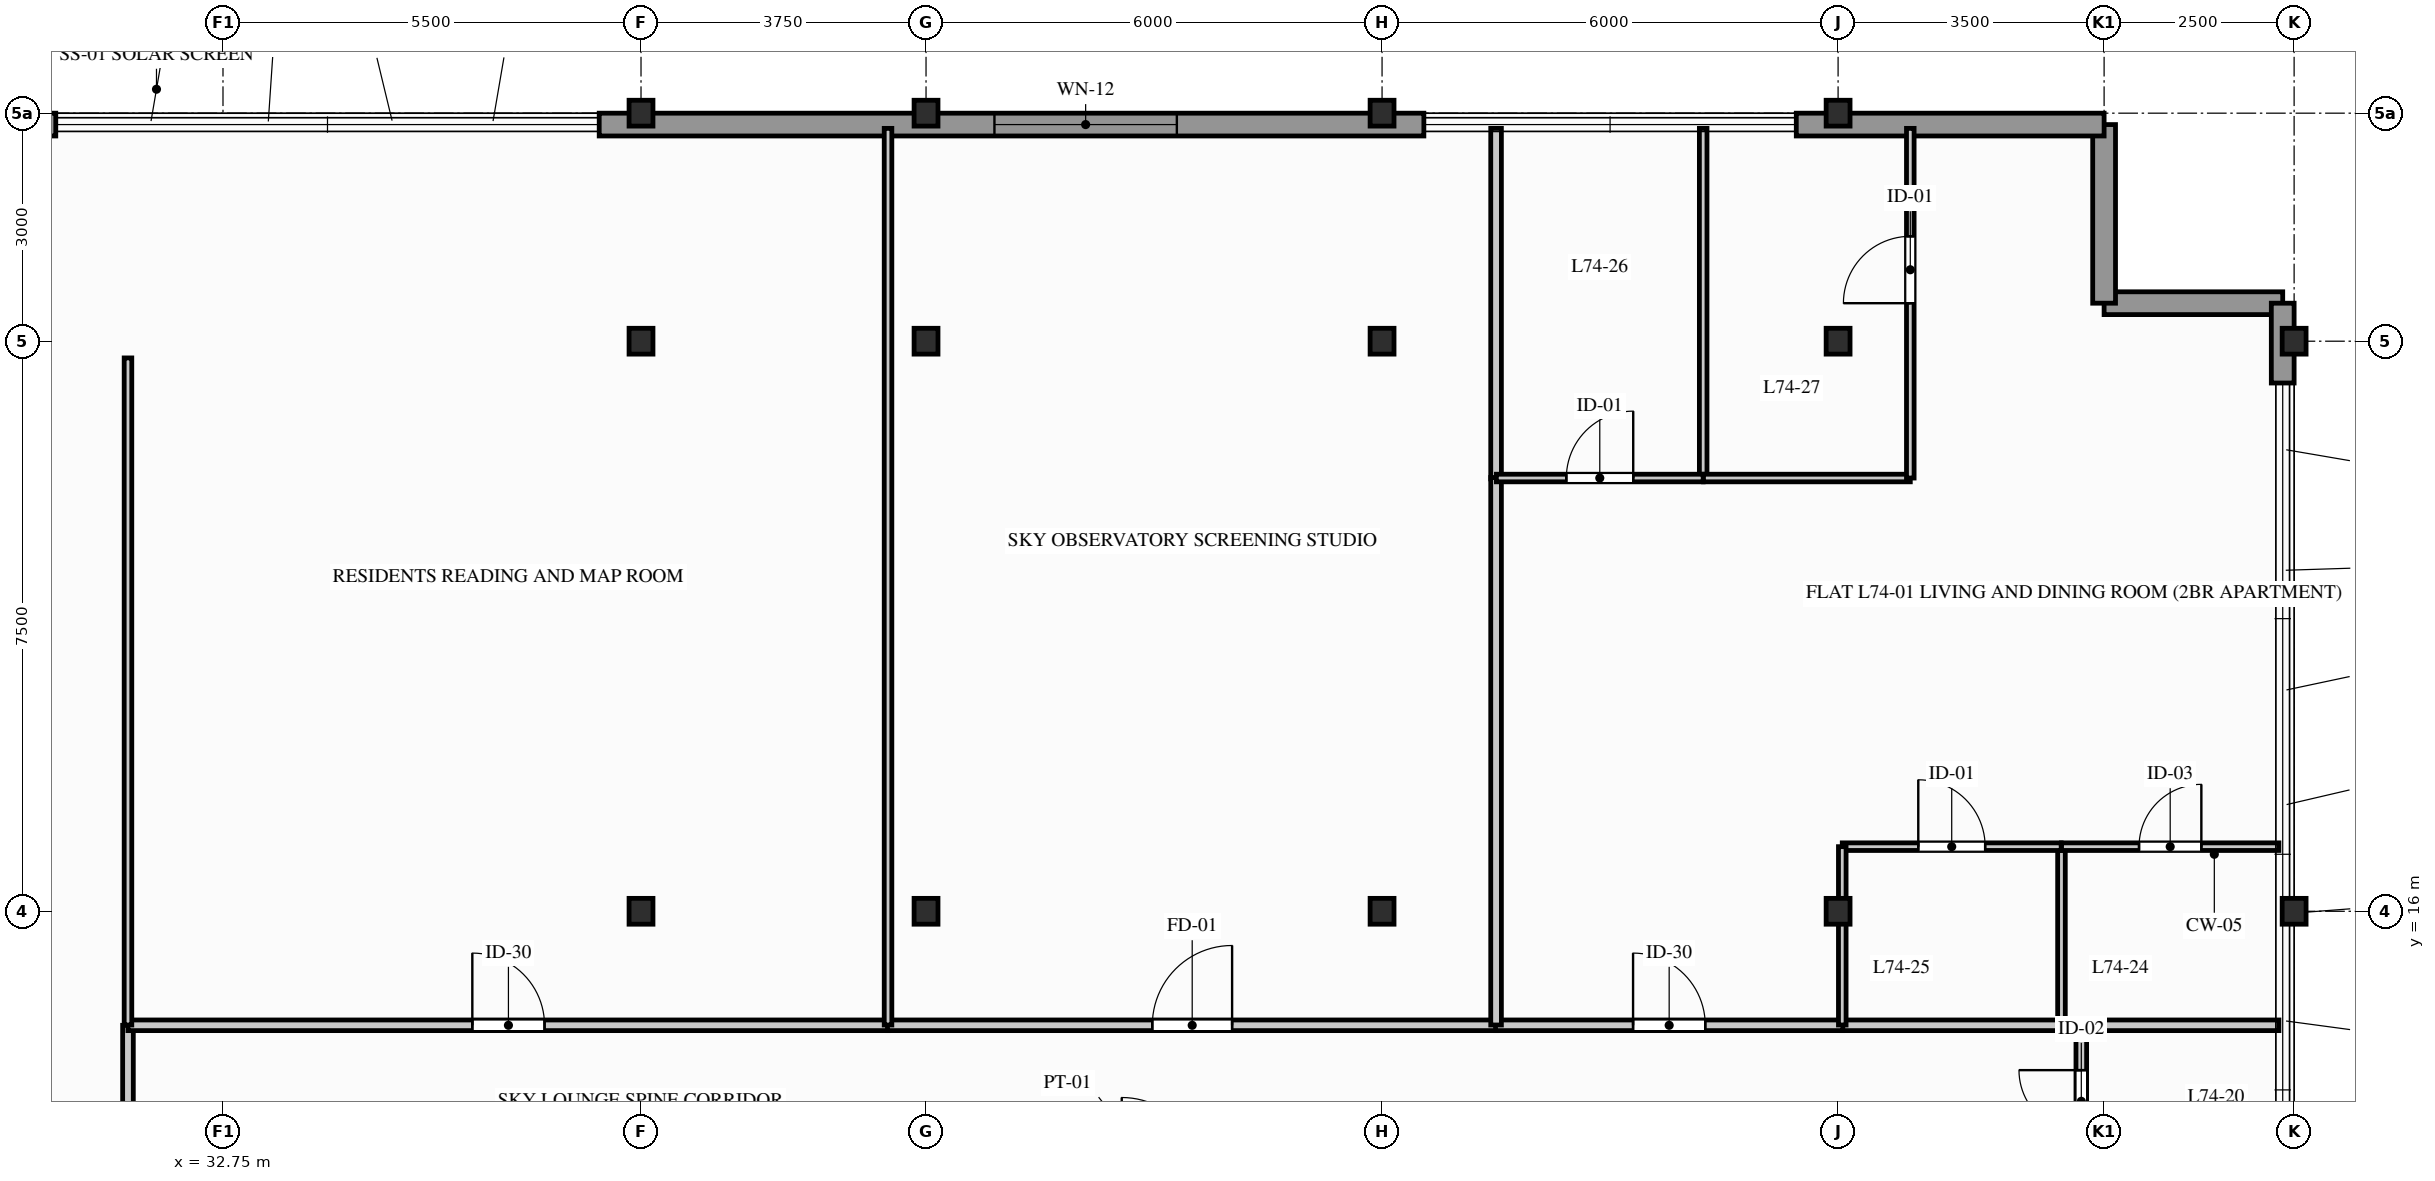
"""IFC4 building model, lengths in metres.
Left out: names, types, materials, properties, quantities, classifications, styles, units other than length and angle.
Written with IfcOpenShell. Run it as: python <this file> out.ifc"""

import sys

from ifc_helpers import new_model, si_unit, direction, frame, frame_2d, origin, origin_2d, place, context, subcontext, project, spatial, rectangle, i_section, extrude, element, fill, save


model = new_model("IFC4")
c1 = context("Model", 3, precision=1e-05, world=origin(), true_north=direction((0.0, 1.0)))
c2 = subcontext(c1, "Body", "Model", "MODEL_VIEW")
j1 = project(units=[si_unit("LENGTHUNIT", "METRE"), si_unit("PLANEANGLEUNIT", "RADIAN")], contexts=[c1])
p1 = place(None, origin())
s1 = spatial("IfcSite", under=j1, at=p1, CompositionType="ELEMENT")
p2 = place(p1, origin())
s2 = spatial("IfcBuilding", under=s1, at=p2, CompositionType="ELEMENT")
p3 = place(p2, frame((0.0, 0.0, 243.65)))
s3 = spatial("IfcBuildingStorey", under=s2, at=p3, CompositionType="ELEMENT", Elevation=243.65)
for number, where, z_axis, x_axis in (
    (1, (38.25, 16.0, 0.0), (0.0, 0.0, 1.0), (1.0, 0.0, 0.0)),
    (2, (38.25, 23.5, 0.0), (0.0, 0.0, 1.0), (1.0, 0.0, 0.0)),
    (3, (38.25, 26.5, 0.0), (0.0, 0.0, 1.0), (1.0, 0.0, 0.0)),
    (4, (42.0, 16.0, 0.0), (0.0, 0.0, 1.0), (1.0, 0.0, 0.0)),
    (5, (42.0, 23.5, 0.0), (0.0, 0.0, 1.0), (1.0, 0.0, 0.0)),
    (6, (42.0, 26.5, 0.0), (0.0, 0.0, 1.0), (1.0, 0.0, 0.0)),
    (7, (48.0, 16.0, 0.0), (0.0, 0.0, 1.0), (1.0, 0.0, 0.0)),
    (8, (48.0, 23.5, 0.0), (0.0, 0.0, 1.0), (1.0, 0.0, 0.0)),
    (9, (48.0, 26.5, 0.0), (0.0, 0.0, 1.0), (1.0, 0.0, 0.0)),
    (10, (54.0, 16.0, 0.0), (0.0, 0.0, 1.0), (1.0, 0.0, 0.0)),
    (11, (54.0, 23.5, 0.0), (0.0, 0.0, 1.0), (1.0, 0.0, 0.0)),
    (12, (54.0, 26.5, 0.0), (0.0, 0.0, 1.0), (1.0, 0.0, 0.0)),
    (13, (60.0, 16.0, 0.0), (0.0, 0.0, 1.0), (1.0, 0.0, 0.0)),
    (14, (60.0, 23.5, 0.0), (0.0, 0.0, 1.0), (1.0, 0.0, 0.0)),
):
    element("IfcColumn", number, at=place(p3, frame(where, z_axis=z_axis, x_axis=x_axis)), inside=s3, PredefinedType="COLUMN", context=c2, shape_type="SweptSolid", body=[
        extrude(i_section(OverallWidth=0.314, OverallDepth=0.34, WebThickness=0.019, FlangeThickness=0.031, FilletRadius=0.015, at=origin_2d()), origin(), (0.0, 0.0, 1.0), 3.6),
    ])
for number, where, z_axis, x_axis in (
    (15, (59.85, 24.0, 0.0), (0.0, 0.0, 1.0), (-1.0, 0.0, 0.0)),
    (16, (57.5, 24.0, 0.0), (0.0, 0.0, 1.0), (0.0, 1.0, 0.0)),
):
    element("IfcWall", number, at=place(p3, frame(where, z_axis=z_axis, x_axis=x_axis)), inside=s3, PredefinedType="STANDARD", context=c2, shape_type="SweptSolid", body=[
        extrude(rectangle(XDim=2.35, YDim=0.3, at=frame_2d((1.175, 0.0))), origin(), (0.0, 0.0, 1.0), 3.34),
    ])
p4 = place(p3, frame((59.85, 22.95, 0.0), z_axis=(0.0, 0.0, 1.0), x_axis=(0.0, 1.0, 0.0)))
e17 = element("IfcWall", 17, at=p4, inside=s3, PredefinedType="STANDARD", context=c2, shape_type="SweptSolid", body=[
    extrude(rectangle(XDim=1.05, YDim=0.3, at=frame_2d((0.525, 0.0))), origin(), (0.0, 0.0, 1.0), 3.34),
])
p5 = place(p3, frame((29.75, 26.35, 0.0), z_axis=(0.0, 0.0, 1.0), x_axis=(1.0, 0.0, 0.0)))
e18 = element("IfcWall", 18, at=p5, inside=s3, PredefinedType="STANDARD", context=c2, shape_type="SweptSolid", body=[
    extrude(rectangle(XDim=0.8, YDim=0.3, at=frame_2d((0.4, 0.0))), origin(), (0.0, 0.0, 1.0), 3.34),
])
p6 = place(p3, frame((37.7, 26.35, 0.0), z_axis=(0.0, 0.0, 1.0), x_axis=(1.0, 0.0, 0.0)))
e19 = element("IfcWall", 19, at=p6, inside=s3, PredefinedType="STANDARD", context=c2, shape_type="SweptSolid", body=[
    extrude(rectangle(XDim=10.85, YDim=0.3, at=frame_2d((5.425, 0.0))), origin(), (0.0, 0.0, 1.0), 2.776),
])
p7 = place(p6, frame((5.2, 0.0, 0.555)))
e20 = element("IfcOpeningElement", 20, at=p7, cuts=e19, PredefinedType="OPENING", context=c2, shape_type="SweptSolid", body=[
    extrude(rectangle(XDim=2.4, YDim=2.0, at=frame_2d((1.2, 1.0))), frame((0.0, 0.16, 0.0), z_axis=(0.0, -1.0, 0.0), x_axis=(1.0, 0.0, 0.0)), (0.0, 0.0, 1.0), 0.32),
])
p8 = place(p3, frame((53.45, 26.35, 0.0), z_axis=(0.0, 0.0, 1.0), x_axis=(1.0, 0.0, 0.0)))
e21 = element("IfcWall", 21, at=p8, inside=s3, PredefinedType="STANDARD", context=c2, shape_type="SweptSolid", body=[
    extrude(rectangle(XDim=4.05, YDim=0.3, at=frame_2d((2.025, 0.0))), origin(), (0.0, 0.0, 1.0), 3.34),
])
p9 = place(p3, frame((57.2, 12.5, 0.0), z_axis=(0.0, 0.0, 1.0), x_axis=(0.0, 1.0, 0.0)))
e22 = element("IfcWall", 22, at=p9, inside=s3, PredefinedType="PARTITIONING", context=c2, shape_type="SweptSolid", body=[
    extrude(rectangle(XDim=2.0, YDim=0.14, at=frame_2d((1.0, 0.0))), origin(), (0.0, 0.0, 1.0), 3.34),
])
p10 = place(p9, frame((0.59, 0.0, 0.0)))
e23 = element("IfcOpeningElement", 23, at=p10, cuts=e22, PredefinedType="OPENING", context=c2, shape_type="SweptSolid", body=[
    extrude(rectangle(XDim=0.82, YDim=2.02, at=frame_2d((0.41, 1.01))), frame((0.0, 0.08, 0.0), z_axis=(0.0, -1.0, 0.0), x_axis=(1.0, 0.0, 0.0)), (0.0, 0.0, 1.0), 0.16),
])
p11 = place(p3, frame((31.5, 12.504, 0.0), z_axis=(0.0, 0.0, 1.0), x_axis=(0.0, 1.0, 0.0)))
e24 = element("IfcWall", 24, at=p11, inside=s3, PredefinedType="PARTITIONING", context=c2, shape_type="SweptSolid", body=[
    extrude(rectangle(XDim=1.996, YDim=0.14, at=frame_2d((0.998, 0.0))), origin(), (0.0, 0.0, 1.0), 3.34),
])
p12 = place(p3, frame((31.5, 14.5, 0.0), z_axis=(0.0, 0.0, 1.0), x_axis=(1.0, 0.0, 0.0)))
e25 = element("IfcWall", 25, at=p12, inside=s3, PredefinedType="PARTITIONING", context=c2, shape_type="SweptSolid", body=[
    extrude(rectangle(XDim=10.011, YDim=0.14, at=frame_2d((5.006, 0.0))), origin(), (0.0, 0.0, 1.0), 2.703),
])
p13 = place(p12, frame((4.531, 0.0, 0.0)))
e26 = element("IfcOpeningElement", 26, at=p13, cuts=e25, PredefinedType="OPENING", context=c2, shape_type="SweptSolid", body=[
    extrude(rectangle(XDim=0.95, YDim=2.05, at=frame_2d((0.475, 1.025))), frame((0.0, 0.08, 0.0), z_axis=(0.0, -1.0, 0.0), x_axis=(1.0, 0.0, 0.0)), (0.0, 0.0, 1.0), 0.16),
])
p14 = place(p3, frame((41.493, 14.5, 0.0), z_axis=(0.0, 0.0, 1.0), x_axis=(1.0, 0.0, 0.0)))
e27 = element("IfcWall", 27, at=p14, inside=s3, PredefinedType="PARTITIONING", context=c2, shape_type="SweptSolid", body=[
    extrude(rectangle(XDim=8.019, YDim=0.14, at=frame_2d((4.009, 0.0))), origin(), (0.0, 0.0, 1.0), 2.703),
])
p15 = place(p14, frame((3.484, 0.0, 0.0)))
e28 = element("IfcOpeningElement", 28, at=p15, cuts=e27, PredefinedType="OPENING", context=c2, shape_type="SweptSolid", body=[
    extrude(rectangle(XDim=1.05, YDim=2.06, at=frame_2d((0.525, 1.03))), frame((0.0, 0.08, 0.0), z_axis=(0.0, -1.0, 0.0), x_axis=(1.0, 0.0, 0.0)), (0.0, 0.0, 1.0), 0.16),
])
p16 = place(p3, frame((54.044, 14.5, 0.0), z_axis=(0.0, 0.0, 1.0), x_axis=(1.0, 0.0, 0.0)))
e29 = element("IfcWall", 29, at=p16, inside=s3, PredefinedType="PARTITIONING", context=c2, shape_type="SweptSolid", body=[
    extrude(rectangle(XDim=2.903, YDim=0.14, at=frame_2d((1.451, 0.0))), origin(), (0.0, 0.0, 1.0), 2.703),
])
p17 = place(p3, frame((49.493, 14.5, 0.0), z_axis=(0.0, 0.0, 1.0), x_axis=(1.0, 0.0, 0.0)))
e30 = element("IfcWall", 30, at=p17, inside=s3, PredefinedType="PARTITIONING", context=c2, shape_type="SweptSolid", body=[
    extrude(rectangle(XDim=4.57, YDim=0.14, at=frame_2d((2.285, 0.0))), origin(), (0.0, 0.0, 1.0), 2.703),
])
p18 = place(p17, frame((1.81, 0.0, 0.0)))
e31 = element("IfcOpeningElement", 31, at=p18, cuts=e30, PredefinedType="OPENING", context=c2, shape_type="SweptSolid", body=[
    extrude(rectangle(XDim=0.95, YDim=2.05, at=frame_2d((0.475, 1.025))), frame((0.0, 0.08, 0.0), z_axis=(0.0, -1.0, 0.0), x_axis=(1.0, 0.0, 0.0)), (0.0, 0.0, 1.0), 0.16),
])
p19 = place(p3, frame((57.204, 14.5, 0.0), z_axis=(0.0, 0.0, 1.0), x_axis=(1.0, 0.0, 0.0)))
e32 = element("IfcWall", 32, at=p19, inside=s3, PredefinedType="PARTITIONING", context=c2, shape_type="SweptSolid", body=[
    extrude(rectangle(XDim=2.596, YDim=0.14, at=frame_2d((1.298, 0.0))), origin(), (0.0, 0.0, 1.0), 3.34),
])
p20 = place(p3, frame((31.5, 14.504, 0.0), z_axis=(0.0, 0.0, 1.0), x_axis=(0.0, 1.0, 0.0)))
e33 = element("IfcWall", 33, at=p20, inside=s3, PredefinedType="PARTITIONING", context=c2, shape_type="SweptSolid", body=[
    extrude(rectangle(XDim=8.776, YDim=0.1, at=frame_2d((4.388, 0.0))), origin(), (0.0, 0.0, 1.0), 2.279),
])
p21 = place(p3, frame((41.5, 14.504, 0.0), z_axis=(0.0, 0.0, 1.0), x_axis=(0.0, 1.0, 0.0)))
e34 = element("IfcWall", 34, at=p21, inside=s3, PredefinedType="PARTITIONING", context=c2, shape_type="SweptSolid", body=[
    extrude(rectangle(XDim=11.796, YDim=0.1, at=frame_2d((5.898, 0.0))), origin(), (0.0, 0.0, 1.0), 2.279),
])
p22 = place(p3, frame((49.5, 21.689, 0.0), z_axis=(0.0, 0.0, 1.0), x_axis=(0.0, 1.0, 0.0)))
e35 = element("IfcWall", 35, at=p22, inside=s3, PredefinedType="PARTITIONING", context=c2, shape_type="SweptSolid", body=[
    extrude(rectangle(XDim=4.611, YDim=0.14, at=frame_2d((2.306, 0.0))), origin(), (0.0, 0.0, 1.0), 2.703),
])
p23 = place(p3, frame((49.5, 14.504, 0.0), z_axis=(0.0, 0.0, 1.0), x_axis=(0.0, 1.0, 0.0)))
e36 = element("IfcWall", 36, at=p23, inside=s3, PredefinedType="PARTITIONING", context=c2, shape_type="SweptSolid", body=[
    extrude(rectangle(XDim=7.203, YDim=0.14, at=frame_2d((3.602, 0.0))), origin(), (0.0, 0.0, 1.0), 2.703),
])
p24 = place(p3, frame((56.939, 14.504, 0.0), z_axis=(0.0, 0.0, 1.0), x_axis=(0.0, 1.0, 0.0)))
e37 = element("IfcWall", 37, at=p24, inside=s3, PredefinedType="PARTITIONING", context=c2, shape_type="SweptSolid", body=[
    extrude(rectangle(XDim=2.346, YDim=0.1, at=frame_2d((1.173, 0.0))), origin(), (0.0, 0.0, 1.0), 2.703),
])
p25 = place(p3, frame((56.939, 16.85, 0.0), z_axis=(0.0, 0.0, 1.0), x_axis=(1.0, 0.0, 0.0)))
e38 = element("IfcWall", 38, at=p25, inside=s3, PredefinedType="PARTITIONING", context=c2, shape_type="SweptSolid", body=[
    extrude(rectangle(XDim=2.861, YDim=0.1, at=frame_2d((1.431, 0.0))), origin(), (0.0, 0.0, 1.0), 3.34),
])
p26 = place(p25, frame((1.021, 0.0, 0.0)))
e39 = element("IfcOpeningElement", 39, at=p26, cuts=e38, PredefinedType="OPENING", context=c2, shape_type="SweptSolid", body=[
    extrude(rectangle(XDim=0.82, YDim=2.02, at=frame_2d((0.41, 1.01))), frame((0.0, 0.06, 0.0), z_axis=(0.0, -1.0, 0.0), x_axis=(1.0, 0.0, 0.0)), (0.0, 0.0, 1.0), 0.12),
])
p27 = place(p3, frame((54.055, 16.85, 0.0), z_axis=(0.0, 0.0, 1.0), x_axis=(1.0, 0.0, 0.0)))
e40 = element("IfcWall", 40, at=p27, inside=s3, PredefinedType="PARTITIONING", context=c2, shape_type="SweptSolid", body=[
    extrude(rectangle(XDim=2.88, YDim=0.1, at=frame_2d((1.44, 0.0))), origin(), (0.0, 0.0, 1.0), 2.703),
])
p28 = place(p27, frame((1.0, 0.0, 0.0)))
e41 = element("IfcOpeningElement", 41, at=p28, cuts=e40, PredefinedType="OPENING", context=c2, shape_type="SweptSolid", body=[
    extrude(rectangle(XDim=0.88, YDim=2.04, at=frame_2d((0.44, 1.02))), frame((0.0, 0.06, 0.0), z_axis=(0.0, -1.0, 0.0), x_axis=(1.0, 0.0, 0.0)), (0.0, 0.0, 1.0), 0.12),
])
p29 = place(p3, frame((54.055, 14.504, 0.0), z_axis=(0.0, 0.0, 1.0), x_axis=(0.0, 1.0, 0.0)))
e42 = element("IfcWall", 42, at=p29, inside=s3, PredefinedType="PARTITIONING", context=c2, shape_type="SweptSolid", body=[
    extrude(rectangle(XDim=2.346, YDim=0.1, at=frame_2d((1.173, 0.0))), origin(), (0.0, 0.0, 1.0), 2.703),
])
p30 = place(p3, frame((52.225, 21.7, 0.0), z_axis=(0.0, 0.0, 1.0), x_axis=(0.0, 1.0, 0.0)))
e43 = element("IfcWall", 43, at=p30, inside=s3, PredefinedType="PARTITIONING", context=c2, shape_type="SweptSolid", body=[
    extrude(rectangle(XDim=4.6, YDim=0.1, at=frame_2d((2.3, 0.0))), origin(), (0.0, 0.0, 1.0), 2.703),
])
p31 = place(p3, frame((49.504, 21.7, 0.0), z_axis=(0.0, 0.0, 1.0), x_axis=(1.0, 0.0, 0.0)))
e44 = element("IfcWall", 44, at=p31, inside=s3, PredefinedType="PARTITIONING", context=c2, shape_type="SweptSolid", body=[
    extrude(rectangle(XDim=2.721, YDim=0.1, at=frame_2d((1.361, 0.0))), origin(), (0.0, 0.0, 1.0), 3.34),
])
p32 = place(p31, frame((0.92, 0.0, 0.0)))
e45 = element("IfcOpeningElement", 45, at=p32, cuts=e44, PredefinedType="OPENING", context=c2, shape_type="SweptSolid", body=[
    extrude(rectangle(XDim=0.88, YDim=2.04, at=frame_2d((0.44, 1.02))), frame((0.0, 0.06, 0.0), z_axis=(0.0, -1.0, 0.0), x_axis=(1.0, 0.0, 0.0)), (0.0, 0.0, 1.0), 0.12),
])
p33 = place(p3, frame((52.229, 21.7, 0.0), z_axis=(0.0, 0.0, 1.0), x_axis=(1.0, 0.0, 0.0)))
e46 = element("IfcWall", 46, at=p33, inside=s3, PredefinedType="PARTITIONING", context=c2, shape_type="SweptSolid", body=[
    extrude(rectangle(XDim=2.721, YDim=0.1, at=frame_2d((1.36, 0.0))), origin(), (0.0, 0.0, 1.0), 2.703),
])
p34 = place(p3, frame((54.95, 21.7, 0.0), z_axis=(0.0, 0.0, 1.0), x_axis=(0.0, 1.0, 0.0)))
e47 = element("IfcWall", 47, at=p34, inside=s3, PredefinedType="PARTITIONING", context=c2, shape_type="SweptSolid", body=[
    extrude(rectangle(XDim=4.6, YDim=0.1, at=frame_2d((2.3, 0.0))), origin(), (0.0, 0.0, 1.0), 2.703),
])
p35 = place(p34, frame((2.3, 0.0, 0.0)))
e48 = element("IfcOpeningElement", 48, at=p35, cuts=e47, PredefinedType="OPENING", context=c2, shape_type="SweptSolid", body=[
    extrude(rectangle(XDim=0.88, YDim=2.04, at=frame_2d((0.44, 1.02))), frame((0.0, 0.06, 0.0), z_axis=(0.0, -1.0, 0.0), x_axis=(1.0, 0.0, 0.0)), (0.0, 0.0, 1.0), 0.12),
])
p36 = place(p7, origin())
e49 = element("IfcWindow", 49, at=p36, inside=s3, PartitioningType="SINGLE_PANEL", PredefinedType="WINDOW", context=c2, shape_type="SweptSolid", body=[
    extrude(rectangle(XDim=2.4, YDim=2.0, at=frame_2d((1.2, 1.0))), frame((0.0, 0.03, 0.0), z_axis=(0.0, -1.0, 0.0), x_axis=(1.0, 0.0, 0.0)), (0.0, 0.0, 1.0), 0.06),
])
fill(e20, e49)
p37 = place(p10, origin())
e50 = element("IfcDoor", 50, at=p37, inside=s3, OperationType="SINGLE_SWING_RIGHT", PredefinedType="DOOR", context=c2, shape_type="SweptSolid", body=[
    extrude(rectangle(XDim=0.82, YDim=2.02, at=frame_2d((0.41, 1.01))), frame((0.0, 0.025, 0.0), z_axis=(0.0, -1.0, 0.0), x_axis=(1.0, 0.0, 0.0)), (0.0, 0.0, 1.0), 0.05),
])
fill(e23, e50)
p38 = place(p13, origin())
e51 = element("IfcDoor", 51, at=p38, inside=s3, OperationType="SINGLE_SWING_LEFT", PredefinedType="DOOR", context=c2, shape_type="SweptSolid", body=[
    extrude(rectangle(XDim=0.95, YDim=2.05, at=frame_2d((0.475, 1.025))), frame((0.0, 0.025, 0.0), z_axis=(0.0, -1.0, 0.0), x_axis=(1.0, 0.0, 0.0)), (0.0, 0.0, 1.0), 0.05),
])
fill(e26, e51)
p39 = place(p15, origin())
e52 = element("IfcDoor", 52, at=p39, inside=s3, OperationType="SINGLE_SWING_RIGHT", PredefinedType="DOOR", context=c2, shape_type="SweptSolid", body=[
    extrude(rectangle(XDim=1.05, YDim=2.06, at=frame_2d((0.525, 1.03))), frame((0.0, 0.025, 0.0), z_axis=(0.0, -1.0, 0.0), x_axis=(1.0, 0.0, 0.0)), (0.0, 0.0, 1.0), 0.05),
])
fill(e28, e52)
p40 = place(p18, origin())
e53 = element("IfcDoor", 53, at=p40, inside=s3, OperationType="SINGLE_SWING_LEFT", PredefinedType="DOOR", context=c2, shape_type="SweptSolid", body=[
    extrude(rectangle(XDim=0.95, YDim=2.05, at=frame_2d((0.475, 1.025))), frame((0.0, 0.025, 0.0), z_axis=(0.0, -1.0, 0.0), x_axis=(1.0, 0.0, 0.0)), (0.0, 0.0, 1.0), 0.05),
])
fill(e31, e53)
p41 = place(p26, origin())
e54 = element("IfcDoor", 54, at=p41, inside=s3, OperationType="SINGLE_SWING_RIGHT", PredefinedType="DOOR", context=c2, shape_type="SweptSolid", body=[
    extrude(rectangle(XDim=0.82, YDim=2.02, at=frame_2d((0.41, 1.01))), frame((0.0, 0.025, 0.0), z_axis=(0.0, -1.0, 0.0), x_axis=(1.0, 0.0, 0.0)), (0.0, 0.0, 1.0), 0.05),
])
fill(e39, e54)
p42 = place(p28, origin())
e55 = element("IfcDoor", 55, at=p42, inside=s3, OperationType="SINGLE_SWING_LEFT", PredefinedType="DOOR", context=c2, shape_type="SweptSolid", body=[
    extrude(rectangle(XDim=0.88, YDim=2.04, at=frame_2d((0.44, 1.02))), frame((0.0, 0.025, 0.0), z_axis=(0.0, -1.0, 0.0), x_axis=(1.0, 0.0, 0.0)), (0.0, 0.0, 1.0), 0.05),
])
fill(e41, e55)
p43 = place(p32, origin())
e56 = element("IfcDoor", 56, at=p43, inside=s3, OperationType="SINGLE_SWING_RIGHT", PredefinedType="DOOR", context=c2, shape_type="SweptSolid", body=[
    extrude(rectangle(XDim=0.88, YDim=2.04, at=frame_2d((0.44, 1.02))), frame((0.0, 0.025, 0.0), z_axis=(0.0, -1.0, 0.0), x_axis=(1.0, 0.0, 0.0)), (0.0, 0.0, 1.0), 0.05),
])
fill(e45, e56)
p44 = place(p35, origin())
e57 = element("IfcDoor", 57, at=p44, inside=s3, OperationType="SINGLE_SWING_LEFT", PredefinedType="DOOR", context=c2, shape_type="SweptSolid", body=[
    extrude(rectangle(XDim=0.88, YDim=2.04, at=frame_2d((0.44, 1.02))), frame((0.0, 0.025, 0.0), z_axis=(0.0, -1.0, 0.0), x_axis=(1.0, 0.0, 0.0)), (0.0, 0.0, 1.0), 0.05),
])
fill(e48, e57)
save(model, sys.argv[1])
